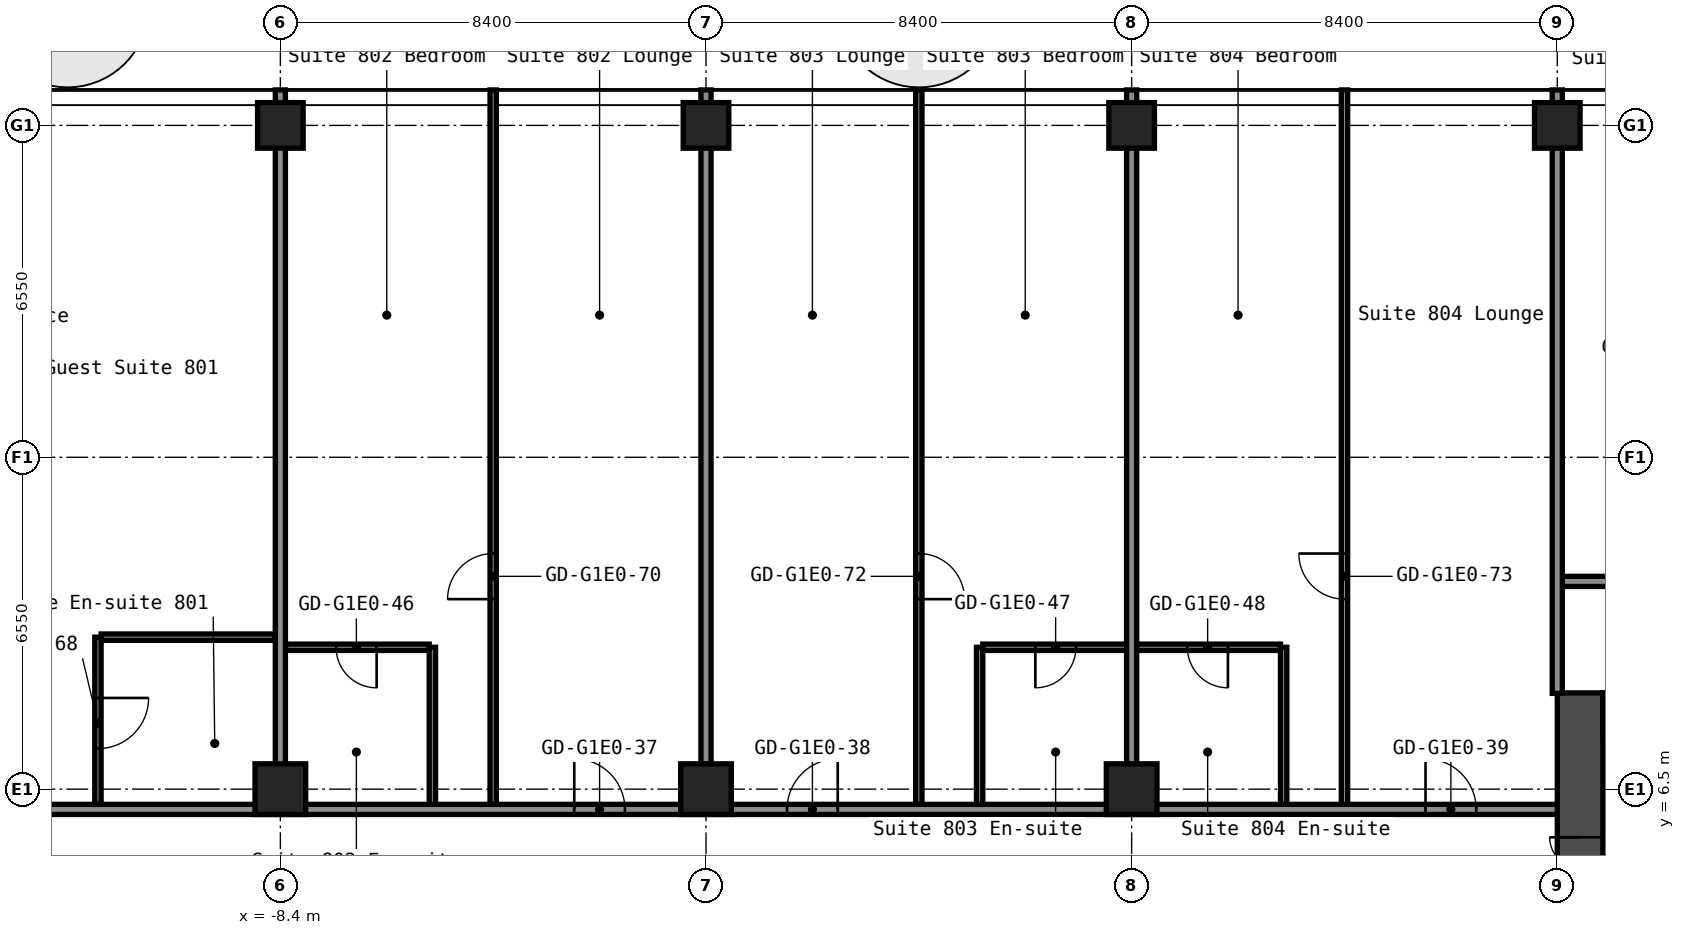
"""IFC4 building model, lengths in metres.
Left out: names, types, materials, properties, quantities, classifications, styles, units other than length and angle.
Written with IfcOpenShell. Run it as: python <this file> out.ifc"""

import sys

from ifc_helpers import new_model, si_unit, direction, frame, frame_2d, origin, origin_2d, place, context, subcontext, project, spatial, rectangle, hollow_rectangle, extrude, element, fill, save


model = new_model("IFC4")
c1 = context("Model", 3, precision=1e-05, world=origin(), true_north=direction((0.0, 1.0)))
c2 = subcontext(c1, "Body", "Model", "MODEL_VIEW")
j1 = project(units=[si_unit("LENGTHUNIT", "METRE"), si_unit("PLANEANGLEUNIT", "RADIAN")], contexts=[c1])
p1 = place(None, origin())
s1 = spatial("IfcSite", under=j1, at=p1, CompositionType="ELEMENT")
p2 = place(p1, origin())
s2 = spatial("IfcBuilding", under=s1, at=p2, CompositionType="ELEMENT")
p3 = place(p2, frame((0.0, 0.0, 32.6)))
s3 = spatial("IfcBuildingStorey", under=s2, at=p3, CompositionType="ELEMENT", Elevation=32.6)
p4 = place(p3, frame((-8.4, 6.5, 0.0), z_axis=(0.0, 0.0, 1.0), x_axis=(1.0, 0.0, 0.0)))
e1 = element("IfcColumn", 1, at=p4, inside=s3, PredefinedType="COLUMN", context=c2, shape_type="SweptSolid", body=[
    extrude(hollow_rectangle(XDim=1.0, YDim=1.0, WallThickness=0.04, at=origin_2d()), origin(), (0.0, 0.0, 1.0), 2.8),
])
p5 = place(p3, frame((-8.4, 19.6, 0.0), z_axis=(0.0, 0.0, 1.0), x_axis=(1.0, 0.0, 0.0)))
e2 = element("IfcColumn", 2, at=p5, inside=s3, PredefinedType="COLUMN", context=c2, shape_type="SweptSolid", body=[
    extrude(hollow_rectangle(XDim=0.9, YDim=0.9, WallThickness=0.036, at=origin_2d()), origin(), (0.0, 0.0, 1.0), 2.8),
])
p6 = place(p3, frame((0.0, 6.5, 0.0), z_axis=(0.0, 0.0, 1.0), x_axis=(1.0, 0.0, 0.0)))
e3 = element("IfcColumn", 3, at=p6, inside=s3, PredefinedType="COLUMN", context=c2, shape_type="SweptSolid", body=[
    extrude(hollow_rectangle(XDim=1.0, YDim=1.0, WallThickness=0.04, at=origin_2d()), origin(), (0.0, 0.0, 1.0), 2.8),
])
p7 = place(p3, frame((0.0, 19.6, 0.0), z_axis=(0.0, 0.0, 1.0), x_axis=(1.0, 0.0, 0.0)))
e4 = element("IfcColumn", 4, at=p7, inside=s3, PredefinedType="COLUMN", context=c2, shape_type="SweptSolid", body=[
    extrude(hollow_rectangle(XDim=0.9, YDim=0.9, WallThickness=0.036, at=origin_2d()), origin(), (0.0, 0.0, 1.0), 2.8),
])
p8 = place(p3, frame((8.4, 6.5, 0.0), z_axis=(0.0, 0.0, 1.0), x_axis=(1.0, 0.0, 0.0)))
e5 = element("IfcColumn", 5, at=p8, inside=s3, PredefinedType="COLUMN", context=c2, shape_type="SweptSolid", body=[
    extrude(hollow_rectangle(XDim=1.0, YDim=1.0, WallThickness=0.04, at=origin_2d()), origin(), (0.0, 0.0, 1.0), 2.8),
])
for number, where, z_axis, x_axis in (
    (6, (8.4, 19.6, 0.0), (0.0, 0.0, 1.0), (1.0, 0.0, 0.0)),
    (7, (16.8, 19.6, 0.0), (0.0, 0.0, 1.0), (1.0, 0.0, 0.0)),
):
    element("IfcColumn", number, at=place(p3, frame(where, z_axis=z_axis, x_axis=x_axis)), inside=s3, PredefinedType="COLUMN", context=c2, shape_type="SweptSolid", body=[
        extrude(hollow_rectangle(XDim=0.9, YDim=0.9, WallThickness=0.036, at=origin_2d()), origin(), (0.0, 0.0, 1.0), 2.8),
    ])
p9 = place(p3, frame((17.25, -8.4, 0.0), z_axis=(0.0, 0.0, 1.0), x_axis=(0.0, 1.0, 0.0)))
e8 = element("IfcWall", 8, at=p9, inside=s3, PredefinedType="SHEAR", context=c2, shape_type="SweptSolid", body=[
    extrude(rectangle(XDim=16.8, YDim=0.9, at=frame_2d((8.4, 0.0))), origin(), (0.0, 0.0, 1.0), 2.8),
])
p10 = place(p9, frame((12.75, 0.0, 0.0)))
e9 = element("IfcOpeningElement", 9, at=p10, cuts=e8, PredefinedType="OPENING", context=c2, shape_type="SweptSolid", body=[
    extrude(rectangle(XDim=1.2, YDim=2.1, at=frame_2d((0.6, 1.05))), frame((0.0, 0.46, 0.0), z_axis=(0.0, -1.0, 0.0), x_axis=(1.0, 0.0, 0.0)), (0.0, 0.0, 1.0), 0.92),
])
p11 = place(p9, frame((2.85, 0.0, 0.0)))
e10 = element("IfcOpeningElement", 10, at=p11, cuts=e8, PredefinedType="OPENING", context=c2, shape_type="SweptSolid", body=[
    extrude(rectangle(XDim=1.2, YDim=2.1, at=frame_2d((0.6, 1.05))), frame((0.0, 0.46, 0.0), z_axis=(0.0, -1.0, 0.0), x_axis=(1.0, 0.0, 0.0)), (0.0, 0.0, 1.0), 0.92),
])
p12 = place(p3, frame((17.7, 7.95, 0.0), z_axis=(0.0, 0.0, 1.0), x_axis=(1.0, 0.0, 0.0)))
e11 = element("IfcWall", 11, at=p12, inside=s3, PredefinedType="SHEAR", context=c2, shape_type="SweptSolid", body=[
    extrude(rectangle(XDim=15.0, YDim=0.9, at=frame_2d((7.5, 0.0))), origin(), (0.0, 0.0, 1.0), 2.8),
])
p13 = place(p12, frame((10.4, 0.0, 0.0)))
e12 = element("IfcOpeningElement", 12, at=p13, cuts=e11, PredefinedType="OPENING", context=c2, shape_type="SweptSolid", body=[
    extrude(rectangle(XDim=1.2, YDim=2.1, at=frame_2d((0.6, 1.05))), frame((0.0, 0.46, 0.0), z_axis=(0.0, -1.0, 0.0), x_axis=(1.0, 0.0, 0.0)), (0.0, 0.0, 1.0), 0.92),
])
p14 = place(p12, frame((13.35, 0.0, 0.0)))
e13 = element("IfcOpeningElement", 13, at=p14, cuts=e11, PredefinedType="OPENING", context=c2, shape_type="SweptSolid", body=[
    extrude(rectangle(XDim=0.9, YDim=2.1, at=frame_2d((0.45, 1.05))), frame((0.0, 0.46, 0.0), z_axis=(0.0, -1.0, 0.0), x_axis=(1.0, 0.0, 0.0)), (0.0, 0.0, 1.0), 0.92),
])
p15 = place(p3, frame((-16.8, 6.1, 0.0), z_axis=(0.0, 0.0, 1.0), x_axis=(1.0, 0.0, 0.0)))
e14 = element("IfcWall", 14, at=p15, inside=s3, PredefinedType="PARTITIONING", context=c2, shape_type="SweptSolid", body=[
    extrude(rectangle(XDim=33.6, YDim=0.2, at=frame_2d((16.8, 0.0))), origin(), (0.0, 0.0, 1.0), 2.8),
])
p16 = place(p15, frame((1.9, 0.0, 0.0)))
e15 = element("IfcOpeningElement", 15, at=p16, cuts=e14, PredefinedType="OPENING", context=c2, shape_type="SweptSolid", body=[
    extrude(rectangle(XDim=1.0, YDim=2.1, at=frame_2d((0.5, 1.05))), frame((0.0, 0.11, 0.0), z_axis=(0.0, -1.0, 0.0), x_axis=(1.0, 0.0, 0.0)), (0.0, 0.0, 1.0), 0.22),
])
p17 = place(p15, frame((14.2, 0.0, 0.0)))
e16 = element("IfcOpeningElement", 16, at=p17, cuts=e14, PredefinedType="OPENING", context=c2, shape_type="SweptSolid", body=[
    extrude(rectangle(XDim=1.0, YDim=2.1, at=frame_2d((0.5, 1.05))), frame((0.0, 0.11, 0.0), z_axis=(0.0, -1.0, 0.0), x_axis=(1.0, 0.0, 0.0)), (0.0, 0.0, 1.0), 0.22),
])
p18 = place(p15, frame((18.4, 0.0, 0.0)))
e17 = element("IfcOpeningElement", 17, at=p18, cuts=e14, PredefinedType="OPENING", context=c2, shape_type="SweptSolid", body=[
    extrude(rectangle(XDim=1.0, YDim=2.1, at=frame_2d((0.5, 1.05))), frame((0.0, 0.11, 0.0), z_axis=(0.0, -1.0, 0.0), x_axis=(1.0, 0.0, 0.0)), (0.0, 0.0, 1.0), 0.22),
])
p19 = place(p15, frame((31.0, 0.0, 0.0)))
e18 = element("IfcOpeningElement", 18, at=p19, cuts=e14, PredefinedType="OPENING", context=c2, shape_type="SweptSolid", body=[
    extrude(rectangle(XDim=1.0, YDim=2.1, at=frame_2d((0.5, 1.05))), frame((0.0, 0.11, 0.0), z_axis=(0.0, -1.0, 0.0), x_axis=(1.0, 0.0, 0.0)), (0.0, 0.0, 1.0), 0.22),
])
p20 = place(p3, frame((-8.3, 9.3, 0.0), z_axis=(0.0, 0.0, 1.0), x_axis=(1.0, 0.0, 0.0)))
e19 = element("IfcWall", 19, at=p20, inside=s3, PredefinedType="PARTITIONING", context=c2, shape_type="SweptSolid", body=[
    extrude(rectangle(XDim=2.838, YDim=0.125, at=frame_2d((1.419, 0.0))), origin(), (0.0, 0.0, 1.0), 2.8),
])
p21 = place(p20, frame((1.0, 0.0, 0.0)))
e20 = element("IfcOpeningElement", 20, at=p21, cuts=e19, PredefinedType="OPENING", context=c2, shape_type="SweptSolid", body=[
    extrude(rectangle(XDim=0.8, YDim=2.1, at=frame_2d((0.4, 1.05))), frame((0.0, 0.073, 0.0), z_axis=(0.0, -1.0, 0.0), x_axis=(1.0, 0.0, 0.0)), (0.0, 0.0, 1.0), 0.145),
])
p22 = place(p3, frame((5.462, 9.3, 0.0), z_axis=(0.0, 0.0, 1.0), x_axis=(1.0, 0.0, 0.0)))
e21 = element("IfcWall", 21, at=p22, inside=s3, PredefinedType="PARTITIONING", context=c2, shape_type="SweptSolid", body=[
    extrude(rectangle(XDim=5.875, YDim=0.125, at=frame_2d((2.938, 0.0))), origin(), (0.0, 0.0, 1.0), 2.8),
])
p23 = place(p22, frame((1.038, 0.0, 0.0)))
e22 = element("IfcOpeningElement", 22, at=p23, cuts=e21, PredefinedType="OPENING", context=c2, shape_type="SweptSolid", body=[
    extrude(rectangle(XDim=0.8, YDim=2.1, at=frame_2d((0.4, 1.05))), frame((0.0, 0.073, 0.0), z_axis=(0.0, -1.0, 0.0), x_axis=(1.0, 0.0, 0.0)), (0.0, 0.0, 1.0), 0.145),
])
p24 = place(p22, frame((4.038, 0.0, 0.0)))
e23 = element("IfcOpeningElement", 23, at=p24, cuts=e21, PredefinedType="OPENING", context=c2, shape_type="SweptSolid", body=[
    extrude(rectangle(XDim=0.8, YDim=2.1, at=frame_2d((0.4, 1.05))), frame((0.0, 0.073, 0.0), z_axis=(0.0, -1.0, 0.0), x_axis=(1.0, 0.0, 0.0)), (0.0, 0.0, 1.0), 0.145),
])
p25 = place(p3, frame((-11.938, 9.5, 0.0), z_axis=(0.0, 0.0, 1.0), x_axis=(1.0, 0.0, 0.0)))
e24 = element("IfcWall", 24, at=p25, inside=s3, PredefinedType="PARTITIONING", context=c2, shape_type="SweptSolid", body=[
    extrude(rectangle(XDim=3.438, YDim=0.125, at=frame_2d((1.719, 0.0))), origin(), (0.0, 0.0, 1.0), 2.8),
])
p26 = place(p3, frame((16.8, 10.6, 0.0), z_axis=(0.0, 0.0, 1.0), x_axis=(1.0, 0.0, 0.0)))
e25 = element("IfcWall", 25, at=p26, inside=s3, PredefinedType="PARTITIONING", context=c2, shape_type="SweptSolid", body=[
    extrude(rectangle(XDim=34.3, YDim=0.2, at=frame_2d((17.15, 0.0))), origin(), (0.0, 0.0, 1.0), 2.8),
])
p27 = place(p26, frame((1.6, 0.0, 0.0)))
e26 = element("IfcOpeningElement", 26, at=p27, cuts=e25, PredefinedType="OPENING", context=c2, shape_type="SweptSolid", body=[
    extrude(rectangle(XDim=1.0, YDim=2.1, at=frame_2d((0.5, 1.05))), frame((0.0, 0.11, 0.0), z_axis=(0.0, -1.0, 0.0), x_axis=(1.0, 0.0, 0.0)), (0.0, 0.0, 1.0), 0.22),
])
p28 = place(p26, frame((10.0, 0.0, 0.0)))
e27 = element("IfcOpeningElement", 27, at=p28, cuts=e25, PredefinedType="OPENING", context=c2, shape_type="SweptSolid", body=[
    extrude(rectangle(XDim=1.0, YDim=2.1, at=frame_2d((0.5, 1.05))), frame((0.0, 0.11, 0.0), z_axis=(0.0, -1.0, 0.0), x_axis=(1.0, 0.0, 0.0)), (0.0, 0.0, 1.0), 0.22),
])
p29 = place(p26, frame((18.4, 0.0, 0.0)))
e28 = element("IfcOpeningElement", 28, at=p29, cuts=e25, PredefinedType="OPENING", context=c2, shape_type="SweptSolid", body=[
    extrude(rectangle(XDim=1.0, YDim=2.1, at=frame_2d((0.5, 1.05))), frame((0.0, 0.11, 0.0), z_axis=(0.0, -1.0, 0.0), x_axis=(1.0, 0.0, 0.0)), (0.0, 0.0, 1.0), 0.22),
])
p30 = place(p26, frame((26.9, 0.0, 0.0)))
e29 = element("IfcOpeningElement", 29, at=p30, cuts=e25, PredefinedType="OPENING", context=c2, shape_type="SweptSolid", body=[
    extrude(rectangle(XDim=1.0, YDim=2.1, at=frame_2d((0.5, 1.05))), frame((0.0, 0.11, 0.0), z_axis=(0.0, -1.0, 0.0), x_axis=(1.0, 0.0, 0.0)), (0.0, 0.0, 1.0), 0.22),
])
p31 = place(p3, frame((-12.0, 6.2, 0.0), z_axis=(0.0, 0.0, 1.0), x_axis=(0.0, 1.0, 0.0)))
e30 = element("IfcWall", 30, at=p31, inside=s3, PredefinedType="PARTITIONING", context=c2, shape_type="SweptSolid", body=[
    extrude(rectangle(XDim=3.3, YDim=0.125, at=frame_2d((1.65, 0.0))), origin(), (0.0, 0.0, 1.0), 2.8),
])
p32 = place(p31, frame((1.1, 0.0, 0.0)))
e31 = element("IfcOpeningElement", 31, at=p32, cuts=e30, PredefinedType="OPENING", context=c2, shape_type="SweptSolid", body=[
    extrude(rectangle(XDim=1.0, YDim=2.1, at=frame_2d((0.5, 1.05))), frame((0.0, 0.073, 0.0), z_axis=(0.0, -1.0, 0.0), x_axis=(1.0, 0.0, 0.0)), (0.0, 0.0, 1.0), 0.145),
])
p33 = place(p3, frame((-8.4, 6.99, 0.0), z_axis=(0.0, 0.0, 1.0), x_axis=(0.0, 1.0, 0.0)))
e32 = element("IfcWall", 32, at=p33, inside=s3, PredefinedType="PARTITIONING", context=c2, shape_type="SweptSolid", body=[
    extrude(rectangle(XDim=13.31, YDim=0.2, at=frame_2d((6.655, 0.0))), origin(), (0.0, 0.0, 1.0), 2.8),
])
p34 = place(p3, frame((-5.4, 6.2, 0.0), z_axis=(0.0, 0.0, 1.0), x_axis=(0.0, 1.0, 0.0)))
e33 = element("IfcWall", 33, at=p34, inside=s3, PredefinedType="PARTITIONING", context=c2, shape_type="SweptSolid", body=[
    extrude(rectangle(XDim=3.1, YDim=0.125, at=frame_2d((1.55, 0.0))), origin(), (0.0, 0.0, 1.0), 2.8),
])
p35 = place(p3, frame((-4.2, 6.2, 0.0), z_axis=(0.0, 0.0, 1.0), x_axis=(0.0, 1.0, 0.0)))
e34 = element("IfcWall", 34, at=p35, inside=s3, PredefinedType="PARTITIONING", context=c2, shape_type="SweptSolid", body=[
    extrude(rectangle(XDim=14.1, YDim=0.125, at=frame_2d((7.05, 0.0))), origin(), (0.0, 0.0, 1.0), 2.8),
])
p36 = place(p35, frame((4.05, 0.0, 0.0)))
e35 = element("IfcOpeningElement", 35, at=p36, cuts=e34, PredefinedType="OPENING", context=c2, shape_type="SweptSolid", body=[
    extrude(rectangle(XDim=0.9, YDim=2.1, at=frame_2d((0.45, 1.05))), frame((0.0, 0.073, 0.0), z_axis=(0.0, -1.0, 0.0), x_axis=(1.0, 0.0, 0.0)), (0.0, 0.0, 1.0), 0.145),
])
p37 = place(p3, frame((0.0, 6.99, 0.0), z_axis=(0.0, 0.0, 1.0), x_axis=(0.0, 1.0, 0.0)))
e36 = element("IfcWall", 36, at=p37, inside=s3, PredefinedType="PARTITIONING", context=c2, shape_type="SweptSolid", body=[
    extrude(rectangle(XDim=13.31, YDim=0.2, at=frame_2d((6.655, 0.0))), origin(), (0.0, 0.0, 1.0), 2.8),
])
p38 = place(p3, frame((4.2, 6.2, 0.0), z_axis=(0.0, 0.0, 1.0), x_axis=(0.0, 1.0, 0.0)))
e37 = element("IfcWall", 37, at=p38, inside=s3, PredefinedType="PARTITIONING", context=c2, shape_type="SweptSolid", body=[
    extrude(rectangle(XDim=14.1, YDim=0.125, at=frame_2d((7.05, 0.0))), origin(), (0.0, 0.0, 1.0), 2.8),
])
p39 = place(p38, frame((4.05, 0.0, 0.0)))
e38 = element("IfcOpeningElement", 38, at=p39, cuts=e37, PredefinedType="OPENING", context=c2, shape_type="SweptSolid", body=[
    extrude(rectangle(XDim=0.9, YDim=2.1, at=frame_2d((0.45, 1.05))), frame((0.0, 0.073, 0.0), z_axis=(0.0, -1.0, 0.0), x_axis=(1.0, 0.0, 0.0)), (0.0, 0.0, 1.0), 0.145),
])
p40 = place(p3, frame((5.4, 6.2, 0.0), z_axis=(0.0, 0.0, 1.0), x_axis=(0.0, 1.0, 0.0)))
e39 = element("IfcWall", 39, at=p40, inside=s3, PredefinedType="PARTITIONING", context=c2, shape_type="SweptSolid", body=[
    extrude(rectangle(XDim=3.1, YDim=0.125, at=frame_2d((1.55, 0.0))), origin(), (0.0, 0.0, 1.0), 2.8),
])
p41 = place(p3, frame((8.4, 6.99, 0.0), z_axis=(0.0, 0.0, 1.0), x_axis=(0.0, 1.0, 0.0)))
e40 = element("IfcWall", 40, at=p41, inside=s3, PredefinedType="PARTITIONING", context=c2, shape_type="SweptSolid", body=[
    extrude(rectangle(XDim=13.31, YDim=0.2, at=frame_2d((6.655, 0.0))), origin(), (0.0, 0.0, 1.0), 2.8),
])
p42 = place(p3, frame((11.4, 6.2, 0.0), z_axis=(0.0, 0.0, 1.0), x_axis=(0.0, 1.0, 0.0)))
e41 = element("IfcWall", 41, at=p42, inside=s3, PredefinedType="PARTITIONING", context=c2, shape_type="SweptSolid", body=[
    extrude(rectangle(XDim=3.1, YDim=0.125, at=frame_2d((1.55, 0.0))), origin(), (0.0, 0.0, 1.0), 2.8),
])
p43 = place(p3, frame((12.6, 6.2, 0.0), z_axis=(0.0, 0.0, 1.0), x_axis=(0.0, 1.0, 0.0)))
e42 = element("IfcWall", 42, at=p43, inside=s3, PredefinedType="PARTITIONING", context=c2, shape_type="SweptSolid", body=[
    extrude(rectangle(XDim=14.1, YDim=0.125, at=frame_2d((7.05, 0.0))), origin(), (0.0, 0.0, 1.0), 2.8),
])
p44 = place(p43, frame((4.05, 0.0, 0.0)))
e43 = element("IfcOpeningElement", 43, at=p44, cuts=e42, PredefinedType="OPENING", context=c2, shape_type="SweptSolid", body=[
    extrude(rectangle(XDim=0.9, YDim=2.1, at=frame_2d((0.45, 1.05))), frame((0.0, 0.073, 0.0), z_axis=(0.0, -1.0, 0.0), x_axis=(1.0, 0.0, 0.0)), (0.0, 0.0, 1.0), 0.145),
])
p45 = place(p3, frame((16.8, 8.39, 0.0), z_axis=(0.0, 0.0, 1.0), x_axis=(0.0, 1.0, 0.0)))
e44 = element("IfcWall", 44, at=p45, inside=s3, PredefinedType="PARTITIONING", context=c2, shape_type="SweptSolid", body=[
    extrude(rectangle(XDim=11.91, YDim=0.2, at=frame_2d((5.955, 0.0))), origin(), (0.0, 0.0, 1.0), 2.8),
])
p46 = place(p10, origin())
e45 = element("IfcDoor", 45, at=p46, inside=s3, OperationType="DOUBLE_DOOR_SINGLE_SWING", PredefinedType="DOOR", context=c2, shape_type="SweptSolid", body=[
    extrude(rectangle(XDim=1.2, YDim=2.1, at=frame_2d((0.6, 1.05))), frame((0.0, 0.025, 0.0), z_axis=(0.0, -1.0, 0.0), x_axis=(1.0, 0.0, 0.0)), (0.0, 0.0, 1.0), 0.05),
])
fill(e9, e45)
p47 = place(p17, origin())
e46 = element("IfcDoor", 46, at=p47, inside=s3, OperationType="SINGLE_SWING_RIGHT", PredefinedType="DOOR", context=c2, shape_type="SweptSolid", body=[
    extrude(rectangle(XDim=1.0, YDim=2.1, at=frame_2d((0.5, 1.05))), frame((0.0, 0.025, 0.0), z_axis=(0.0, -1.0, 0.0), x_axis=(1.0, 0.0, 0.0)), (0.0, 0.0, 1.0), 0.05),
])
fill(e16, e46)
p48 = place(p18, origin())
e47 = element("IfcDoor", 47, at=p48, inside=s3, OperationType="SINGLE_SWING_LEFT", PredefinedType="DOOR", context=c2, shape_type="SweptSolid", body=[
    extrude(rectangle(XDim=1.0, YDim=2.1, at=frame_2d((0.5, 1.05))), frame((0.0, 0.025, 0.0), z_axis=(0.0, -1.0, 0.0), x_axis=(1.0, 0.0, 0.0)), (0.0, 0.0, 1.0), 0.05),
])
fill(e17, e47)
p49 = place(p19, origin())
e48 = element("IfcDoor", 48, at=p49, inside=s3, OperationType="SINGLE_SWING_RIGHT", PredefinedType="DOOR", context=c2, shape_type="SweptSolid", body=[
    extrude(rectangle(XDim=1.0, YDim=2.1, at=frame_2d((0.5, 1.05))), frame((0.0, 0.025, 0.0), z_axis=(0.0, -1.0, 0.0), x_axis=(1.0, 0.0, 0.0)), (0.0, 0.0, 1.0), 0.05),
])
fill(e18, e48)
p50 = place(p21, origin())
e49 = element("IfcDoor", 49, at=p50, inside=s3, OperationType="SINGLE_SWING_RIGHT", PredefinedType="DOOR", context=c2, shape_type="SweptSolid", body=[
    extrude(rectangle(XDim=0.8, YDim=2.1, at=frame_2d((0.4, 1.05))), frame((0.0, 0.025, 0.0), z_axis=(0.0, -1.0, 0.0), x_axis=(1.0, 0.0, 0.0)), (0.0, 0.0, 1.0), 0.05),
])
fill(e20, e49)
p51 = place(p23, origin())
e50 = element("IfcDoor", 50, at=p51, inside=s3, OperationType="SINGLE_SWING_LEFT", PredefinedType="DOOR", context=c2, shape_type="SweptSolid", body=[
    extrude(rectangle(XDim=0.8, YDim=2.1, at=frame_2d((0.4, 1.05))), frame((0.0, 0.025, 0.0), z_axis=(0.0, -1.0, 0.0), x_axis=(1.0, 0.0, 0.0)), (0.0, 0.0, 1.0), 0.05),
])
fill(e22, e50)
p52 = place(p24, origin())
e51 = element("IfcDoor", 51, at=p52, inside=s3, OperationType="SINGLE_SWING_RIGHT", PredefinedType="DOOR", context=c2, shape_type="SweptSolid", body=[
    extrude(rectangle(XDim=0.8, YDim=2.1, at=frame_2d((0.4, 1.05))), frame((0.0, 0.025, 0.0), z_axis=(0.0, -1.0, 0.0), x_axis=(1.0, 0.0, 0.0)), (0.0, 0.0, 1.0), 0.05),
])
fill(e23, e51)
p53 = place(p32, origin())
e52 = element("IfcDoor", 52, at=p53, inside=s3, OperationType="SINGLE_SWING_RIGHT", PredefinedType="DOOR", context=c2, shape_type="SweptSolid", body=[
    extrude(rectangle(XDim=1.0, YDim=2.1, at=frame_2d((0.5, 1.05))), frame((0.0, 0.025, 0.0), z_axis=(0.0, -1.0, 0.0), x_axis=(1.0, 0.0, 0.0)), (0.0, 0.0, 1.0), 0.05),
])
fill(e31, e52)
p54 = place(p36, origin())
e53 = element("IfcDoor", 53, at=p54, inside=s3, OperationType="SINGLE_SWING_RIGHT", PredefinedType="DOOR", context=c2, shape_type="SweptSolid", body=[
    extrude(rectangle(XDim=0.9, YDim=2.1, at=frame_2d((0.45, 1.05))), frame((0.0, 0.025, 0.0), z_axis=(0.0, -1.0, 0.0), x_axis=(1.0, 0.0, 0.0)), (0.0, 0.0, 1.0), 0.05),
])
fill(e35, e53)
p55 = place(p39, origin())
e54 = element("IfcDoor", 54, at=p55, inside=s3, OperationType="SINGLE_SWING_LEFT", PredefinedType="DOOR", context=c2, shape_type="SweptSolid", body=[
    extrude(rectangle(XDim=0.9, YDim=2.1, at=frame_2d((0.45, 1.05))), frame((0.0, 0.025, 0.0), z_axis=(0.0, -1.0, 0.0), x_axis=(1.0, 0.0, 0.0)), (0.0, 0.0, 1.0), 0.05),
])
fill(e38, e54)
p56 = place(p44, origin())
e55 = element("IfcDoor", 55, at=p56, inside=s3, OperationType="SINGLE_SWING_LEFT", PredefinedType="DOOR", context=c2, shape_type="SweptSolid", body=[
    extrude(rectangle(XDim=0.9, YDim=2.1, at=frame_2d((0.45, 1.05))), frame((0.0, 0.025, 0.0), z_axis=(0.0, -1.0, 0.0), x_axis=(1.0, 0.0, 0.0)), (0.0, 0.0, 1.0), 0.05),
])
fill(e43, e55)
save(model, sys.argv[1])
